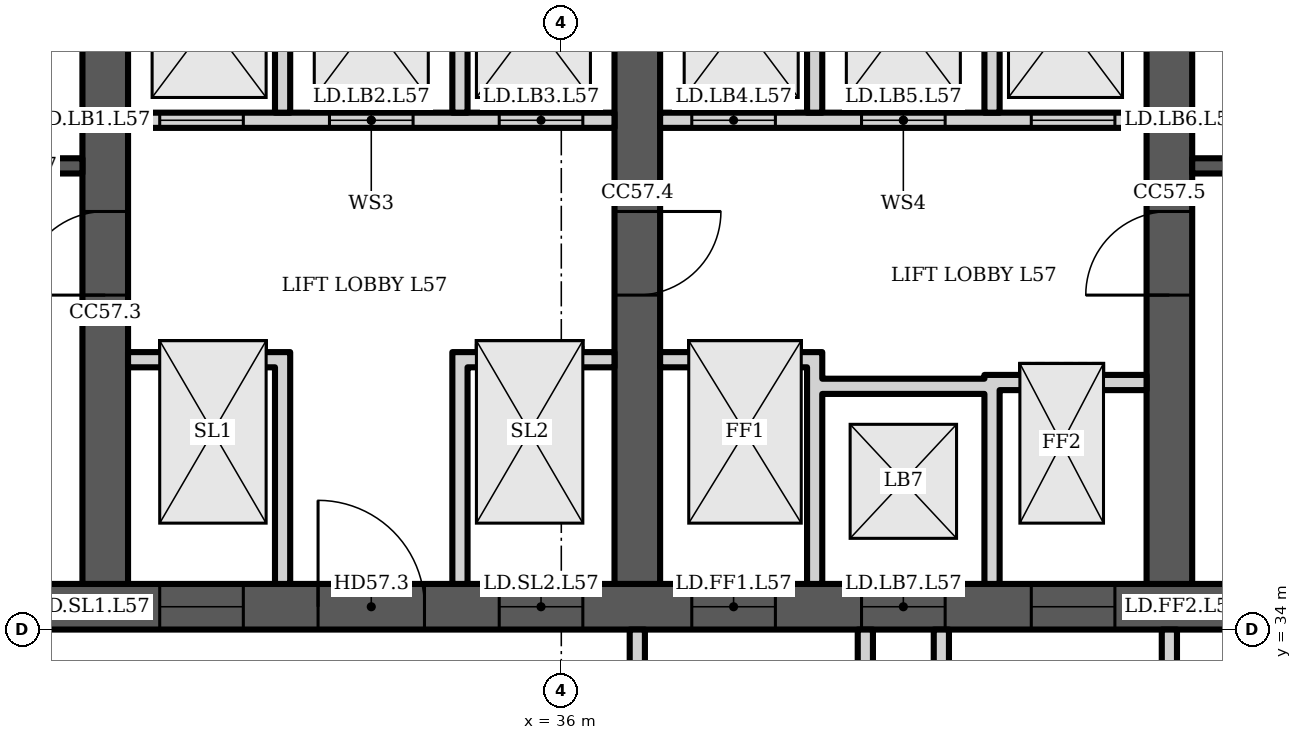
"""IFC4 building model, lengths in metres.
Left out: names, types, materials, properties, quantities, classifications, styles, units other than length and angle.
Written with IfcOpenShell. Run it as: python <this file> out.ifc"""

import sys

from ifc_helpers import new_model, si_unit, direction, frame, frame_2d, origin, place, context, subcontext, project, spatial, polyline, rectangle, outline, extrude, element, fill, save


model = new_model("IFC4")
c1 = context("Model", 3, precision=1e-05, world=origin(), true_north=direction((0.0, 1.0)))
c2 = subcontext(c1, "Body", "Model", "MODEL_VIEW")
j1 = project(units=[si_unit("LENGTHUNIT", "METRE"), si_unit("PLANEANGLEUNIT", "RADIAN")], contexts=[c1])
p1 = place(None, origin())
s1 = spatial("IfcSite", under=j1, at=p1, CompositionType="ELEMENT")
p2 = place(p1, origin())
s2 = spatial("IfcBuilding", under=s1, at=p2, CompositionType="ELEMENT")
p3 = place(p2, frame((0.0, 0.0, 228.7)))
s3 = spatial("IfcBuildingStorey", under=s2, at=p3, CompositionType="ELEMENT", Elevation=228.7)
p4 = place(p3, frame((23.0, 34.3, 0.0), z_axis=(0.0, 0.0, 1.0), x_axis=(1.0, 0.0, 0.0)))
e1 = element("IfcWall", 1, at=p4, inside=s3, PredefinedType="SHEAR", context=c2, shape_type="SweptSolid", body=[
    extrude(rectangle(XDim=35.0, YDim=0.6, at=frame_2d((17.5, 0.0))), origin(), (0.0, 0.0, 1.0), 3.6),
])
p5 = place(p4, frame((0.65, 0.0, 0.0)))
e2 = element("IfcOpeningElement", 2, at=p5, cuts=e1, PredefinedType="OPENING", context=c2, shape_type="SweptSolid", body=[
    extrude(rectangle(XDim=1.2, YDim=2.1, at=frame_2d((0.6, 1.05))), frame((0.0, 0.31, 0.0), z_axis=(0.0, -1.0, 0.0), x_axis=(1.0, 0.0, 0.0)), (0.0, 0.0, 1.0), 0.62),
])
p6 = place(p4, frame((7.717, 0.0, 0.0)))
e3 = element("IfcOpeningElement", 3, at=p6, cuts=e1, PredefinedType="OPENING", context=c2, shape_type="SweptSolid", body=[
    extrude(rectangle(XDim=1.1, YDim=2.1, at=frame_2d((0.55, 1.05))), frame((0.0, 0.31, 0.0), z_axis=(0.0, -1.0, 0.0), x_axis=(1.0, 0.0, 0.0)), (0.0, 0.0, 1.0), 0.62),
])
p7 = place(p4, frame((12.183, 0.0, 0.0)))
e4 = element("IfcOpeningElement", 4, at=p7, cuts=e1, PredefinedType="OPENING", context=c2, shape_type="SweptSolid", body=[
    extrude(rectangle(XDim=1.1, YDim=2.1, at=frame_2d((0.55, 1.05))), frame((0.0, 0.31, 0.0), z_axis=(0.0, -1.0, 0.0), x_axis=(1.0, 0.0, 0.0)), (0.0, 0.0, 1.0), 0.62),
])
p8 = place(p4, frame((9.8, 0.0, 0.0)))
e5 = element("IfcOpeningElement", 5, at=p8, cuts=e1, PredefinedType="OPENING", context=c2, shape_type="SweptSolid", body=[
    extrude(rectangle(XDim=1.4, YDim=2.1, at=frame_2d((0.7, 1.05))), frame((0.0, 0.31, 0.0), z_axis=(0.0, -1.0, 0.0), x_axis=(1.0, 0.0, 0.0)), (0.0, 0.0, 1.0), 0.62),
])
p9 = place(p4, frame((14.717, 0.0, 0.0)))
e6 = element("IfcOpeningElement", 6, at=p9, cuts=e1, PredefinedType="OPENING", context=c2, shape_type="SweptSolid", body=[
    extrude(rectangle(XDim=1.1, YDim=2.1, at=frame_2d((0.55, 1.05))), frame((0.0, 0.31, 0.0), z_axis=(0.0, -1.0, 0.0), x_axis=(1.0, 0.0, 0.0)), (0.0, 0.0, 1.0), 0.62),
])
p10 = place(p4, frame((16.95, 0.0, 0.0)))
e7 = element("IfcOpeningElement", 7, at=p10, cuts=e1, PredefinedType="OPENING", context=c2, shape_type="SweptSolid", body=[
    extrude(rectangle(XDim=1.1, YDim=2.1, at=frame_2d((0.55, 1.05))), frame((0.0, 0.31, 0.0), z_axis=(0.0, -1.0, 0.0), x_axis=(1.0, 0.0, 0.0)), (0.0, 0.0, 1.0), 0.62),
])
p11 = place(p4, frame((19.183, 0.0, 0.0)))
e8 = element("IfcOpeningElement", 8, at=p11, cuts=e1, PredefinedType="OPENING", context=c2, shape_type="SweptSolid", body=[
    extrude(rectangle(XDim=1.1, YDim=2.1, at=frame_2d((0.55, 1.05))), frame((0.0, 0.31, 0.0), z_axis=(0.0, -1.0, 0.0), x_axis=(1.0, 0.0, 0.0)), (0.0, 0.0, 1.0), 0.62),
])
p12 = place(p4, frame((26.15, 0.0, 0.0)))
e9 = element("IfcOpeningElement", 9, at=p12, cuts=e1, PredefinedType="OPENING", context=c2, shape_type="SweptSolid", body=[
    extrude(rectangle(XDim=1.2, YDim=2.1, at=frame_2d((0.6, 1.05))), frame((0.0, 0.31, 0.0), z_axis=(0.0, -1.0, 0.0), x_axis=(1.0, 0.0, 0.0)), (0.0, 0.0, 1.0), 0.62),
])
p13 = place(p4, frame((28.767, 0.0, 0.0)))
e10 = element("IfcOpeningElement", 10, at=p13, cuts=e1, PredefinedType="OPENING", context=c2, shape_type="SweptSolid", body=[
    extrude(rectangle(XDim=1.0, YDim=2.1, at=frame_2d((0.5, 1.05))), frame((0.0, 0.31, 0.0), z_axis=(0.0, -1.0, 0.0), x_axis=(1.0, 0.0, 0.0)), (0.0, 0.0, 1.0), 0.62),
])
p14 = place(p4, frame((33.083, 0.0, 0.0)))
e11 = element("IfcOpeningElement", 11, at=p14, cuts=e1, PredefinedType="OPENING", context=c2, shape_type="SweptSolid", body=[
    extrude(rectangle(XDim=1.0, YDim=2.1, at=frame_2d((0.5, 1.05))), frame((0.0, 0.31, 0.0), z_axis=(0.0, -1.0, 0.0), x_axis=(1.0, 0.0, 0.0)), (0.0, 0.0, 1.0), 0.62),
])
p15 = place(p4, frame((30.8, 0.0, 0.0)))
e12 = element("IfcOpeningElement", 12, at=p15, cuts=e1, PredefinedType="OPENING", context=c2, shape_type="SweptSolid", body=[
    extrude(rectangle(XDim=1.4, YDim=2.1, at=frame_2d((0.7, 1.05))), frame((0.0, 0.31, 0.0), z_axis=(0.0, -1.0, 0.0), x_axis=(1.0, 0.0, 0.0)), (0.0, 0.0, 1.0), 0.62),
])
p16 = place(p3, frame((30.0, 34.6, 0.0), z_axis=(0.0, 0.0, 1.0), x_axis=(0.0, 1.0, 0.0)))
e13 = element("IfcWall", 13, at=p16, inside=s3, PredefinedType="SHEAR", context=c2, shape_type="SweptSolid", body=[
    extrude(rectangle(XDim=14.171, YDim=0.6, at=frame_2d((7.085, 0.0))), origin(), (0.0, 0.0, 1.0), 3.6),
])
p17 = place(p16, frame((3.8, 0.0, 0.0)))
e14 = element("IfcOpeningElement", 14, at=p17, cuts=e13, PredefinedType="OPENING", context=c2, shape_type="SweptSolid", body=[
    extrude(rectangle(XDim=1.1, YDim=2.1, at=frame_2d((0.55, 1.05))), frame((0.0, 0.31, 0.0), z_axis=(0.0, -1.0, 0.0), x_axis=(1.0, 0.0, 0.0)), (0.0, 0.0, 1.0), 0.62),
])
p18 = place(p3, frame((37.0, 34.6, 0.0), z_axis=(0.0, 0.0, 1.0), x_axis=(0.0, 1.0, 0.0)))
e15 = element("IfcWall", 15, at=p18, inside=s3, PredefinedType="SHEAR", context=c2, shape_type="SweptSolid", body=[
    extrude(rectangle(XDim=14.784, YDim=0.6, at=frame_2d((7.392, 0.0))), origin(), (0.0, 0.0, 1.0), 3.6),
])
p19 = place(p18, frame((11.302, 0.0, 0.0)))
e16 = element("IfcOpeningElement", 16, at=p19, cuts=e15, PredefinedType="OPENING", context=c2, shape_type="SweptSolid", body=[
    extrude(rectangle(XDim=1.0, YDim=2.1, at=frame_2d((0.5, 1.05))), frame((0.0, 0.31, 0.0), z_axis=(0.0, -1.0, 0.0), x_axis=(1.0, 0.0, 0.0)), (0.0, 0.0, 1.0), 0.62),
])
p20 = place(p18, frame((3.8, 0.0, 0.0)))
e17 = element("IfcOpeningElement", 17, at=p20, cuts=e15, PredefinedType="OPENING", context=c2, shape_type="SweptSolid", body=[
    extrude(rectangle(XDim=1.1, YDim=2.1, at=frame_2d((0.55, 1.05))), frame((0.0, 0.31, 0.0), z_axis=(0.0, -1.0, 0.0), x_axis=(1.0, 0.0, 0.0)), (0.0, 0.0, 1.0), 0.62),
])
p21 = place(p3, frame((44.0, 34.6, 0.0), z_axis=(0.0, 0.0, 1.0), x_axis=(0.0, 1.0, 0.0)))
e18 = element("IfcWall", 18, at=p21, inside=s3, PredefinedType="SHEAR", context=c2, shape_type="SweptSolid", body=[
    extrude(rectangle(XDim=14.784, YDim=0.6, at=frame_2d((7.392, 0.0))), origin(), (0.0, 0.0, 1.0), 3.6),
])
p22 = place(p21, frame((11.608, 0.0, 0.0)))
e19 = element("IfcOpeningElement", 19, at=p22, cuts=e18, PredefinedType="OPENING", context=c2, shape_type="SweptSolid", body=[
    extrude(rectangle(XDim=1.0, YDim=2.1, at=frame_2d((0.5, 1.05))), frame((0.0, 0.31, 0.0), z_axis=(0.0, -1.0, 0.0), x_axis=(1.0, 0.0, 0.0)), (0.0, 0.0, 1.0), 0.62),
])
p23 = place(p21, frame((3.8, 0.0, 0.0)))
e20 = element("IfcOpeningElement", 20, at=p23, cuts=e18, PredefinedType="OPENING", context=c2, shape_type="SweptSolid", body=[
    extrude(rectangle(XDim=1.1, YDim=2.1, at=frame_2d((0.55, 1.05))), frame((0.0, 0.31, 0.0), z_axis=(0.0, -1.0, 0.0), x_axis=(1.0, 0.0, 0.0)), (0.0, 0.0, 1.0), 0.62),
])
p24 = place(p3, frame((23.6, 40.1, 0.0), z_axis=(0.0, 0.0, 1.0), x_axis=(1.0, 0.0, 0.0)))
e21 = element("IfcWall", 21, at=p24, inside=s3, PredefinedType="SHEAR", context=c2, shape_type="SweptSolid", body=[
    extrude(rectangle(XDim=6.1, YDim=0.2, at=frame_2d((3.05, 0.0))), origin(), (0.0, 0.0, 1.0), 3.2),
])
p25 = place(p24, frame((3.325, 0.0, 0.0)))
e22 = element("IfcOpeningElement", 22, at=p25, cuts=e21, PredefinedType="OPENING", context=c2, shape_type="SweptSolid", body=[
    extrude(rectangle(XDim=1.2, YDim=2.1, at=frame_2d((0.6, 1.05))), frame((0.0, 0.11, 0.0), z_axis=(0.0, -1.0, 0.0), x_axis=(1.0, 0.0, 0.0)), (0.0, 0.0, 1.0), 0.22),
])
p26 = place(p24, frame((0.475, 0.0, 0.0)))
e23 = element("IfcOpeningElement", 23, at=p26, cuts=e21, PredefinedType="OPENING", context=c2, shape_type="SweptSolid", body=[
    extrude(rectangle(XDim=0.9, YDim=2.1, at=frame_2d((0.45, 1.05))), frame((0.0, 0.11, 0.0), z_axis=(0.0, -1.0, 0.0), x_axis=(1.0, 0.0, 0.0)), (0.0, 0.0, 1.0), 0.22),
])
p27 = place(p3, frame((30.3, 40.7, 0.0), z_axis=(0.0, 0.0, 1.0), x_axis=(1.0, 0.0, 0.0)))
e24 = element("IfcWall", 24, at=p27, inside=s3, PredefinedType="PARTITIONING", context=c2, shape_type="SweptSolid", body=[
    extrude(rectangle(XDim=6.4, YDim=0.2, at=frame_2d((3.2, 0.0))), origin(), (0.0, 0.0, 1.0), 3.2),
])
p28 = place(p27, frame((0.417, 0.0, 0.0)))
e25 = element("IfcOpeningElement", 25, at=p28, cuts=e24, PredefinedType="OPENING", context=c2, shape_type="SweptSolid", body=[
    extrude(rectangle(XDim=1.1, YDim=2.1, at=frame_2d((0.55, 1.05))), frame((0.0, 0.11, 0.0), z_axis=(0.0, -1.0, 0.0), x_axis=(1.0, 0.0, 0.0)), (0.0, 0.0, 1.0), 0.22),
])
p29 = place(p27, frame((2.65, 0.0, 0.0)))
e26 = element("IfcOpeningElement", 26, at=p29, cuts=e24, PredefinedType="OPENING", context=c2, shape_type="SweptSolid", body=[
    extrude(rectangle(XDim=1.1, YDim=2.1, at=frame_2d((0.55, 1.05))), frame((0.0, 0.11, 0.0), z_axis=(0.0, -1.0, 0.0), x_axis=(1.0, 0.0, 0.0)), (0.0, 0.0, 1.0), 0.22),
])
p30 = place(p27, frame((4.883, 0.0, 0.0)))
e27 = element("IfcOpeningElement", 27, at=p30, cuts=e24, PredefinedType="OPENING", context=c2, shape_type="SweptSolid", body=[
    extrude(rectangle(XDim=1.1, YDim=2.1, at=frame_2d((0.55, 1.05))), frame((0.0, 0.11, 0.0), z_axis=(0.0, -1.0, 0.0), x_axis=(1.0, 0.0, 0.0)), (0.0, 0.0, 1.0), 0.22),
])
p31 = place(p3, frame((0.0, 0.0, -0.0)))
e28 = element("IfcWall", 28, at=p31, inside=s3, PredefinedType="PARTITIONING", context=c2, shape_type="SweptSolid", body=[
    extrude(outline(polyline([(32.233, 37.45), (30.3, 37.45), (30.3, 37.65), (32.233, 37.65), (32.433, 37.65), (32.433, 34.6), (32.233, 34.6), (32.233, 37.45)])), origin(), (0.0, 0.0, 1.0), 3.2),
])
p32 = place(p3, frame((0.0, 0.0, -0.0)))
e29 = element("IfcWall", 29, at=p32, inside=s3, PredefinedType="PARTITIONING", context=c2, shape_type="SweptSolid", body=[
    extrude(outline(polyline([(34.567, 37.65), (34.767, 37.65), (36.7, 37.65), (36.7, 37.45), (34.767, 37.45), (34.767, 34.6), (34.567, 34.6), (34.567, 37.65)])), origin(), (0.0, 0.0, 1.0), 3.2),
])
p33 = place(p3, frame((0.0, 0.0, -0.0)))
e30 = element("IfcWall", 30, at=p33, inside=s3, PredefinedType="PARTITIONING", context=c2, shape_type="SweptSolid", body=[
    extrude(outline(polyline([(32.433, 40.8), (32.233, 40.8), (32.233, 43.8), (30.3, 43.8), (30.3, 44.0), (36.7, 44.0), (36.7, 43.8), (34.767, 43.8), (34.767, 40.8), (34.567, 40.8), (34.567, 43.8), (32.433, 43.8), (32.433, 40.8)])), origin(), (0.0, 0.0, 1.0), 3.2),
])
p34 = place(p3, frame((37.3, 40.7, 0.0), z_axis=(0.0, 0.0, 1.0), x_axis=(1.0, 0.0, 0.0)))
e31 = element("IfcWall", 31, at=p34, inside=s3, PredefinedType="PARTITIONING", context=c2, shape_type="SweptSolid", body=[
    extrude(rectangle(XDim=6.4, YDim=0.2, at=frame_2d((3.2, 0.0))), origin(), (0.0, 0.0, 1.0), 3.2),
])
p35 = place(p34, frame((0.417, 0.0, 0.0)))
e32 = element("IfcOpeningElement", 32, at=p35, cuts=e31, PredefinedType="OPENING", context=c2, shape_type="SweptSolid", body=[
    extrude(rectangle(XDim=1.1, YDim=2.1, at=frame_2d((0.55, 1.05))), frame((0.0, 0.11, 0.0), z_axis=(0.0, -1.0, 0.0), x_axis=(1.0, 0.0, 0.0)), (0.0, 0.0, 1.0), 0.22),
])
p36 = place(p34, frame((2.65, 0.0, 0.0)))
e33 = element("IfcOpeningElement", 33, at=p36, cuts=e31, PredefinedType="OPENING", context=c2, shape_type="SweptSolid", body=[
    extrude(rectangle(XDim=1.1, YDim=2.1, at=frame_2d((0.55, 1.05))), frame((0.0, 0.11, 0.0), z_axis=(0.0, -1.0, 0.0), x_axis=(1.0, 0.0, 0.0)), (0.0, 0.0, 1.0), 0.22),
])
p37 = place(p34, frame((4.883, 0.0, 0.0)))
e34 = element("IfcOpeningElement", 34, at=p37, cuts=e31, PredefinedType="OPENING", context=c2, shape_type="SweptSolid", body=[
    extrude(rectangle(XDim=1.1, YDim=2.1, at=frame_2d((0.55, 1.05))), frame((0.0, 0.11, 0.0), z_axis=(0.0, -1.0, 0.0), x_axis=(1.0, 0.0, 0.0)), (0.0, 0.0, 1.0), 0.22),
])
p38 = place(p3, frame((0.0, 0.0, -0.0)))
e35 = element("IfcWall", 35, at=p38, inside=s3, PredefinedType="PARTITIONING", context=c2, shape_type="SweptSolid", body=[
    extrude(outline(polyline([(41.567, 37.1), (39.433, 37.1), (39.433, 34.6), (39.233, 34.6), (39.233, 37.45), (37.3, 37.45), (37.3, 37.65), (39.233, 37.65), (39.433, 37.65), (39.433, 37.3), (41.567, 37.3), (41.567, 37.35), (41.767, 37.35), (43.7, 37.35), (43.7, 37.15), (41.767, 37.15), (41.767, 34.6), (41.567, 34.6), (41.567, 37.1)])), origin(), (0.0, 0.0, 1.0), 3.2),
])
p39 = place(p3, frame((0.0, 0.0, -0.0)))
e36 = element("IfcWall", 36, at=p39, inside=s3, PredefinedType="PARTITIONING", context=c2, shape_type="SweptSolid", body=[
    extrude(outline(polyline([(39.433, 40.8), (39.233, 40.8), (39.233, 43.8), (37.3, 43.8), (37.3, 44.0), (43.7, 44.0), (43.7, 43.8), (41.767, 43.8), (41.767, 40.8), (41.567, 40.8), (41.567, 43.8), (39.433, 43.8), (39.433, 40.8)])), origin(), (0.0, 0.0, 1.0), 3.2),
])
p40 = place(p3, frame((44.3, 40.1, 0.0), z_axis=(0.0, 0.0, 1.0), x_axis=(1.0, 0.0, 0.0)))
e37 = element("IfcWall", 37, at=p40, inside=s3, PredefinedType="SHEAR", context=c2, shape_type="SweptSolid", body=[
    extrude(rectangle(XDim=6.4, YDim=0.2, at=frame_2d((3.2, 0.0))), origin(), (0.0, 0.0, 1.0), 3.2),
])
p41 = place(p40, frame((3.625, 0.0, 0.0)))
e38 = element("IfcOpeningElement", 38, at=p41, cuts=e37, PredefinedType="OPENING", context=c2, shape_type="SweptSolid", body=[
    extrude(rectangle(XDim=1.2, YDim=2.1, at=frame_2d((0.6, 1.05))), frame((0.0, 0.11, 0.0), z_axis=(0.0, -1.0, 0.0), x_axis=(1.0, 0.0, 0.0)), (0.0, 0.0, 1.0), 0.22),
])
p42 = place(p40, frame((0.625, 0.0, 0.0)))
e39 = element("IfcOpeningElement", 39, at=p42, cuts=e37, PredefinedType="OPENING", context=c2, shape_type="SweptSolid", body=[
    extrude(rectangle(XDim=0.9, YDim=2.1, at=frame_2d((0.45, 1.05))), frame((0.0, 0.11, 0.0), z_axis=(0.0, -1.0, 0.0), x_axis=(1.0, 0.0, 0.0)), (0.0, 0.0, 1.0), 0.22),
])
p43 = place(p3, frame((37.0, 30.5, 0.0), z_axis=(0.0, 0.0, 1.0), x_axis=(0.0, 1.0, 0.0)))
e40 = element("IfcWall", 40, at=p43, inside=s3, PredefinedType="PARTITIONING", context=c2, shape_type="SweptSolid", body=[
    extrude(rectangle(XDim=3.5, YDim=0.2, at=frame_2d((1.75, 0.0))), origin(), (0.0, 0.0, 1.0), 3.2),
])
p44 = place(p43, frame((1.2, 0.0, 0.0)))
e41 = element("IfcOpeningElement", 41, at=p44, cuts=e40, PredefinedType="OPENING", context=c2, shape_type="SweptSolid", body=[
    extrude(rectangle(XDim=1.1, YDim=2.1, at=frame_2d((0.55, 1.05))), frame((0.0, 0.11, 0.0), z_axis=(0.0, -1.0, 0.0), x_axis=(1.0, 0.0, 0.0)), (0.0, 0.0, 1.0), 0.22),
])
for number, where, z_axis, x_axis in (
    (42, (40.0, 30.5, 0.0), (0.0, 0.0, 1.0), (0.0, 1.0, 0.0)),
    (43, (41.0, 30.5, 0.0), (0.0, 0.0, 1.0), (0.0, 1.0, 0.0)),
):
    element("IfcWall", number, at=place(p3, frame(where, z_axis=z_axis, x_axis=x_axis)), inside=s3, PredefinedType="PARTITIONING", context=c2, shape_type="SweptSolid", body=[
        extrude(rectangle(XDim=3.5, YDim=0.2, at=frame_2d((1.75, 0.0))), origin(), (0.0, 0.0, 1.0), 3.2),
    ])
p45 = place(p3, frame((44.0, 30.5, 0.0), z_axis=(0.0, 0.0, 1.0), x_axis=(0.0, 1.0, 0.0)))
e44 = element("IfcWall", 44, at=p45, inside=s3, PredefinedType="PARTITIONING", context=c2, shape_type="SweptSolid", body=[
    extrude(rectangle(XDim=3.5, YDim=0.2, at=frame_2d((1.75, 0.0))), origin(), (0.0, 0.0, 1.0), 3.2),
])
p46 = place(p45, frame((1.2, 0.0, 0.0)))
e45 = element("IfcOpeningElement", 45, at=p46, cuts=e44, PredefinedType="OPENING", context=c2, shape_type="SweptSolid", body=[
    extrude(rectangle(XDim=1.1, YDim=2.1, at=frame_2d((0.55, 1.05))), frame((0.0, 0.11, 0.0), z_axis=(0.0, -1.0, 0.0), x_axis=(1.0, 0.0, 0.0)), (0.0, 0.0, 1.0), 0.22),
])
p47 = place(p6, origin())
e46 = element("IfcDoor", 46, at=p47, inside=s3, OperationType="DOUBLE_DOOR_SLIDING", PredefinedType="DOOR", context=c2, shape_type="SweptSolid", body=[
    extrude(rectangle(XDim=1.1, YDim=2.1, at=frame_2d((0.55, 1.05))), frame((0.0, 0.025, 0.0), z_axis=(0.0, -1.0, 0.0), x_axis=(1.0, 0.0, 0.0)), (0.0, 0.0, 1.0), 0.05),
])
fill(e3, e46)
p48 = place(p7, origin())
e47 = element("IfcDoor", 47, at=p48, inside=s3, OperationType="DOUBLE_DOOR_SLIDING", PredefinedType="DOOR", context=c2, shape_type="SweptSolid", body=[
    extrude(rectangle(XDim=1.1, YDim=2.1, at=frame_2d((0.55, 1.05))), frame((0.0, 0.025, 0.0), z_axis=(0.0, -1.0, 0.0), x_axis=(1.0, 0.0, 0.0)), (0.0, 0.0, 1.0), 0.05),
])
fill(e4, e47)
p49 = place(p8, origin())
e48 = element("IfcDoor", 48, at=p49, inside=s3, OperationType="DOUBLE_DOOR_SINGLE_SWING", PredefinedType="DOOR", context=c2, shape_type="SweptSolid", body=[
    extrude(rectangle(XDim=1.4, YDim=2.1, at=frame_2d((0.7, 1.05))), frame((0.0, 0.025, 0.0), z_axis=(0.0, -1.0, 0.0), x_axis=(1.0, 0.0, 0.0)), (0.0, 0.0, 1.0), 0.05),
])
fill(e5, e48)
p50 = place(p28, origin())
e49 = element("IfcDoor", 49, at=p50, inside=s3, OperationType="DOUBLE_DOOR_SLIDING", PredefinedType="DOOR", context=c2, shape_type="SweptSolid", body=[
    extrude(rectangle(XDim=1.1, YDim=2.1, at=frame_2d((0.55, 1.05))), frame((0.0, 0.025, 0.0), z_axis=(0.0, -1.0, 0.0), x_axis=(1.0, 0.0, 0.0)), (0.0, 0.0, 1.0), 0.05),
])
fill(e25, e49)
p51 = place(p29, origin())
e50 = element("IfcDoor", 50, at=p51, inside=s3, OperationType="DOUBLE_DOOR_SLIDING", PredefinedType="DOOR", context=c2, shape_type="SweptSolid", body=[
    extrude(rectangle(XDim=1.1, YDim=2.1, at=frame_2d((0.55, 1.05))), frame((0.0, 0.025, 0.0), z_axis=(0.0, -1.0, 0.0), x_axis=(1.0, 0.0, 0.0)), (0.0, 0.0, 1.0), 0.05),
])
fill(e26, e50)
p52 = place(p30, origin())
e51 = element("IfcDoor", 51, at=p52, inside=s3, OperationType="DOUBLE_DOOR_SLIDING", PredefinedType="DOOR", context=c2, shape_type="SweptSolid", body=[
    extrude(rectangle(XDim=1.1, YDim=2.1, at=frame_2d((0.55, 1.05))), frame((0.0, 0.025, 0.0), z_axis=(0.0, -1.0, 0.0), x_axis=(1.0, 0.0, 0.0)), (0.0, 0.0, 1.0), 0.05),
])
fill(e27, e51)
p53 = place(p9, origin())
e52 = element("IfcDoor", 52, at=p53, inside=s3, OperationType="DOUBLE_DOOR_SLIDING", PredefinedType="DOOR", context=c2, shape_type="SweptSolid", body=[
    extrude(rectangle(XDim=1.1, YDim=2.1, at=frame_2d((0.55, 1.05))), frame((0.0, 0.025, 0.0), z_axis=(0.0, -1.0, 0.0), x_axis=(1.0, 0.0, 0.0)), (0.0, 0.0, 1.0), 0.05),
])
fill(e6, e52)
p54 = place(p10, origin())
e53 = element("IfcDoor", 53, at=p54, inside=s3, OperationType="DOUBLE_DOOR_SLIDING", PredefinedType="DOOR", context=c2, shape_type="SweptSolid", body=[
    extrude(rectangle(XDim=1.1, YDim=2.1, at=frame_2d((0.55, 1.05))), frame((0.0, 0.025, 0.0), z_axis=(0.0, -1.0, 0.0), x_axis=(1.0, 0.0, 0.0)), (0.0, 0.0, 1.0), 0.05),
])
fill(e7, e53)
p55 = place(p11, origin())
e54 = element("IfcDoor", 54, at=p55, inside=s3, OperationType="DOUBLE_DOOR_SLIDING", PredefinedType="DOOR", context=c2, shape_type="SweptSolid", body=[
    extrude(rectangle(XDim=1.1, YDim=2.1, at=frame_2d((0.55, 1.05))), frame((0.0, 0.025, 0.0), z_axis=(0.0, -1.0, 0.0), x_axis=(1.0, 0.0, 0.0)), (0.0, 0.0, 1.0), 0.05),
])
fill(e8, e54)
p56 = place(p35, origin())
e55 = element("IfcDoor", 55, at=p56, inside=s3, OperationType="DOUBLE_DOOR_SLIDING", PredefinedType="DOOR", context=c2, shape_type="SweptSolid", body=[
    extrude(rectangle(XDim=1.1, YDim=2.1, at=frame_2d((0.55, 1.05))), frame((0.0, 0.025, 0.0), z_axis=(0.0, -1.0, 0.0), x_axis=(1.0, 0.0, 0.0)), (0.0, 0.0, 1.0), 0.05),
])
fill(e32, e55)
p57 = place(p36, origin())
e56 = element("IfcDoor", 56, at=p57, inside=s3, OperationType="DOUBLE_DOOR_SLIDING", PredefinedType="DOOR", context=c2, shape_type="SweptSolid", body=[
    extrude(rectangle(XDim=1.1, YDim=2.1, at=frame_2d((0.55, 1.05))), frame((0.0, 0.025, 0.0), z_axis=(0.0, -1.0, 0.0), x_axis=(1.0, 0.0, 0.0)), (0.0, 0.0, 1.0), 0.05),
])
fill(e33, e56)
p58 = place(p37, origin())
e57 = element("IfcDoor", 57, at=p58, inside=s3, OperationType="DOUBLE_DOOR_SLIDING", PredefinedType="DOOR", context=c2, shape_type="SweptSolid", body=[
    extrude(rectangle(XDim=1.1, YDim=2.1, at=frame_2d((0.55, 1.05))), frame((0.0, 0.025, 0.0), z_axis=(0.0, -1.0, 0.0), x_axis=(1.0, 0.0, 0.0)), (0.0, 0.0, 1.0), 0.05),
])
fill(e34, e57)
p59 = place(p17, origin())
e58 = element("IfcDoor", 58, at=p59, inside=s3, OperationType="SINGLE_SWING_LEFT", PredefinedType="DOOR", context=c2, shape_type="SweptSolid", body=[
    extrude(rectangle(XDim=1.1, YDim=2.1, at=frame_2d((0.55, 1.05))), frame((0.0, 0.025, 0.0), z_axis=(0.0, -1.0, 0.0), x_axis=(1.0, 0.0, 0.0)), (0.0, 0.0, 1.0), 0.05),
])
fill(e14, e58)
p60 = place(p20, origin())
e59 = element("IfcDoor", 59, at=p60, inside=s3, OperationType="SINGLE_SWING_RIGHT", PredefinedType="DOOR", context=c2, shape_type="SweptSolid", body=[
    extrude(rectangle(XDim=1.1, YDim=2.1, at=frame_2d((0.55, 1.05))), frame((0.0, 0.025, 0.0), z_axis=(0.0, -1.0, 0.0), x_axis=(1.0, 0.0, 0.0)), (0.0, 0.0, 1.0), 0.05),
])
fill(e17, e59)
p61 = place(p23, origin())
e60 = element("IfcDoor", 60, at=p61, inside=s3, OperationType="SINGLE_SWING_LEFT", PredefinedType="DOOR", context=c2, shape_type="SweptSolid", body=[
    extrude(rectangle(XDim=1.1, YDim=2.1, at=frame_2d((0.55, 1.05))), frame((0.0, 0.025, 0.0), z_axis=(0.0, -1.0, 0.0), x_axis=(1.0, 0.0, 0.0)), (0.0, 0.0, 1.0), 0.05),
])
fill(e20, e60)
save(model, sys.argv[1])
